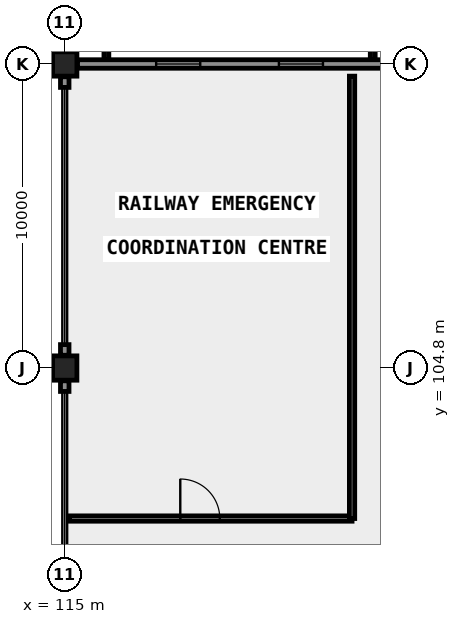
"""IFC4 building model, lengths in metres.
Left out: names, types, materials, properties, quantities, classifications, styles, units other than length and angle.
Written with IfcOpenShell. Run it as: python <this file> out.ifc"""

import sys

from ifc_helpers import new_model, si_unit, direction, frame, frame_2d, origin, origin_2d, place, context, subcontext, project, spatial, rectangle, extrude, element, fill, save


model = new_model("IFC4")
c1 = context("Model", 3, precision=1e-05, world=origin(), true_north=direction((0.0, 1.0)))
c2 = subcontext(c1, "Body", "Model", "MODEL_VIEW")
j1 = project(units=[si_unit("LENGTHUNIT", "METRE"), si_unit("PLANEANGLEUNIT", "RADIAN")], contexts=[c1])
p1 = place(None, origin())
s1 = spatial("IfcSite", under=j1, at=p1, CompositionType="ELEMENT")
p2 = place(p1, origin())
s2 = spatial("IfcBuilding", under=s1, at=p2, CompositionType="ELEMENT")
p3 = place(p2, frame((0.0, 0.0, 18.3)))
s3 = spatial("IfcBuildingStorey", under=s2, at=p3, CompositionType="ELEMENT", Elevation=18.3)
for number, where, z_axis, x_axis in (
    (1, (115.0, 104.8, 0.0), (0.0, 0.0, 1.0), (1.0, 0.0, 0.0)),
    (2, (115.0, 114.8, 0.0), (0.0, 0.0, 1.0), (1.0, 0.0, 0.0)),
):
    element("IfcColumn", number, at=place(p3, frame(where, z_axis=z_axis, x_axis=x_axis)), inside=s3, PredefinedType="COLUMN", context=c2, shape_type="SweptSolid", body=[
        extrude(rectangle(XDim=0.8, YDim=0.8, at=origin_2d()), origin(), (0.0, 0.0, 1.0), 4.16),
    ])
p4 = place(p3, frame((115.42, 114.8, 0.0), z_axis=(0.0, 0.0, 1.0), x_axis=(1.0, 0.0, 0.0)))
e3 = element("IfcWall", 3, at=p4, inside=s3, PredefinedType="SOLIDWALL", context=c2, shape_type="SweptSolid", body=[
    extrude(rectangle(XDim=10.66, YDim=0.28, at=frame_2d((5.33, 0.0))), origin(), (0.0, 0.0, 1.0), 3.1),
])
p5 = place(p4, frame((2.587, 0.0, 0.85)))
e4 = element("IfcOpeningElement", 4, at=p5, cuts=e3, PredefinedType="OPENING", context=c2, shape_type="SweptSolid", body=[
    extrude(rectangle(XDim=1.45, YDim=1.75, at=frame_2d((0.725, 0.875))), frame((0.0, 0.15, 0.0), z_axis=(0.0, -1.0, 0.0), x_axis=(1.0, 0.0, 0.0)), (0.0, 0.0, 1.0), 0.3),
])
p6 = place(p4, frame((6.623, 0.0, 0.85)))
e5 = element("IfcOpeningElement", 5, at=p6, cuts=e3, PredefinedType="OPENING", context=c2, shape_type="SweptSolid", body=[
    extrude(rectangle(XDim=1.45, YDim=1.75, at=frame_2d((0.725, 0.875))), frame((0.0, 0.15, 0.0), z_axis=(0.0, -1.0, 0.0), x_axis=(1.0, 0.0, 0.0)), (0.0, 0.0, 1.0), 0.3),
])
p7 = place(p3, frame((115.0, 104.03, 0.0), z_axis=(0.0, 0.0, 1.0), x_axis=(0.0, 1.0, 0.0)))
e6 = element("IfcWall", 6, at=p7, inside=s3, PredefinedType="SOLIDWALL", context=c2, shape_type="SweptSolid", body=[
    extrude(rectangle(XDim=0.35, YDim=0.28, at=frame_2d((0.175, 0.0))), origin(), (0.0, 0.0, 1.0), 3.89),
])
p8 = place(p3, frame((115.0, 105.22, 0.0), z_axis=(0.0, 0.0, 1.0), x_axis=(0.0, 1.0, 0.0)))
e7 = element("IfcWall", 7, at=p8, inside=s3, PredefinedType="SOLIDWALL", context=c2, shape_type="SweptSolid", body=[
    extrude(rectangle(XDim=0.35, YDim=0.28, at=frame_2d((0.175, 0.0))), origin(), (0.0, 0.0, 1.0), 3.89),
])
p9 = place(p3, frame((115.0, 114.03, 0.0), z_axis=(0.0, 0.0, 1.0), x_axis=(0.0, 1.0, 0.0)))
e8 = element("IfcWall", 8, at=p9, inside=s3, PredefinedType="SOLIDWALL", context=c2, shape_type="SweptSolid", body=[
    extrude(rectangle(XDim=0.35, YDim=0.28, at=frame_2d((0.175, 0.0))), origin(), (0.0, 0.0, 1.0), 3.89),
])
p10 = place(p3, frame((115.16, 99.85, 0.0), z_axis=(0.0, 0.0, 1.0), x_axis=(1.0, 0.0, 0.0)))
e9 = element("IfcWall", 9, at=p10, inside=s3, PredefinedType="PARTITIONING", context=c2, shape_type="SweptSolid", body=[
    extrude(rectangle(XDim=9.29, YDim=0.175, at=frame_2d((4.645, 0.0))), origin(), (0.0, 0.0, 1.0), 3.88),
])
p11 = place(p10, frame((3.64, 0.0, 0.0)))
e10 = element("IfcOpeningElement", 10, at=p11, cuts=e9, PredefinedType="OPENING", context=c2, shape_type="SweptSolid", body=[
    extrude(rectangle(XDim=1.3, YDim=2.2, at=frame_2d((0.65, 1.1))), frame((0.0, 0.098, 0.0), z_axis=(0.0, -1.0, 0.0), x_axis=(1.0, 0.0, 0.0)), (0.0, 0.0, 1.0), 0.195),
])
p12 = place(p3, frame((124.45, 99.85, 0.0), z_axis=(0.0, 0.0, 1.0), x_axis=(0.0, 1.0, 0.0)))
e11 = element("IfcWall", 11, at=p12, inside=s3, PredefinedType="PARTITIONING", context=c2, shape_type="SweptSolid", body=[
    extrude(rectangle(XDim=14.55, YDim=0.175, at=frame_2d((7.275, 0.0))), origin(), (0.0, 0.0, 1.0), 3.88),
])
p13 = place(p5, origin())
e12 = element("IfcWindow", 12, at=p13, inside=s3, PartitioningType="SINGLE_PANEL", PredefinedType="WINDOW", context=c2, shape_type="SweptSolid", body=[
    extrude(rectangle(XDim=1.45, YDim=1.75, at=frame_2d((0.725, 0.875))), frame((0.0, 0.03, 0.0), z_axis=(0.0, -1.0, 0.0), x_axis=(1.0, 0.0, 0.0)), (0.0, 0.0, 1.0), 0.06),
])
fill(e4, e12)
p14 = place(p6, origin())
e13 = element("IfcWindow", 13, at=p14, inside=s3, PartitioningType="SINGLE_PANEL", PredefinedType="WINDOW", context=c2, shape_type="SweptSolid", body=[
    extrude(rectangle(XDim=1.45, YDim=1.75, at=frame_2d((0.725, 0.875))), frame((0.0, 0.03, 0.0), z_axis=(0.0, -1.0, 0.0), x_axis=(1.0, 0.0, 0.0)), (0.0, 0.0, 1.0), 0.06),
])
fill(e5, e13)
p15 = place(p11, origin())
e14 = element("IfcDoor", 14, at=p15, inside=s3, OperationType="SINGLE_SWING_LEFT", PredefinedType="DOOR", context=c2, shape_type="SweptSolid", body=[
    extrude(rectangle(XDim=1.3, YDim=2.2, at=frame_2d((0.65, 1.1))), frame((0.0, 0.025, 0.0), z_axis=(0.0, -1.0, 0.0), x_axis=(1.0, 0.0, 0.0)), (0.0, 0.0, 1.0), 0.05),
])
fill(e10, e14)
save(model, sys.argv[1])
